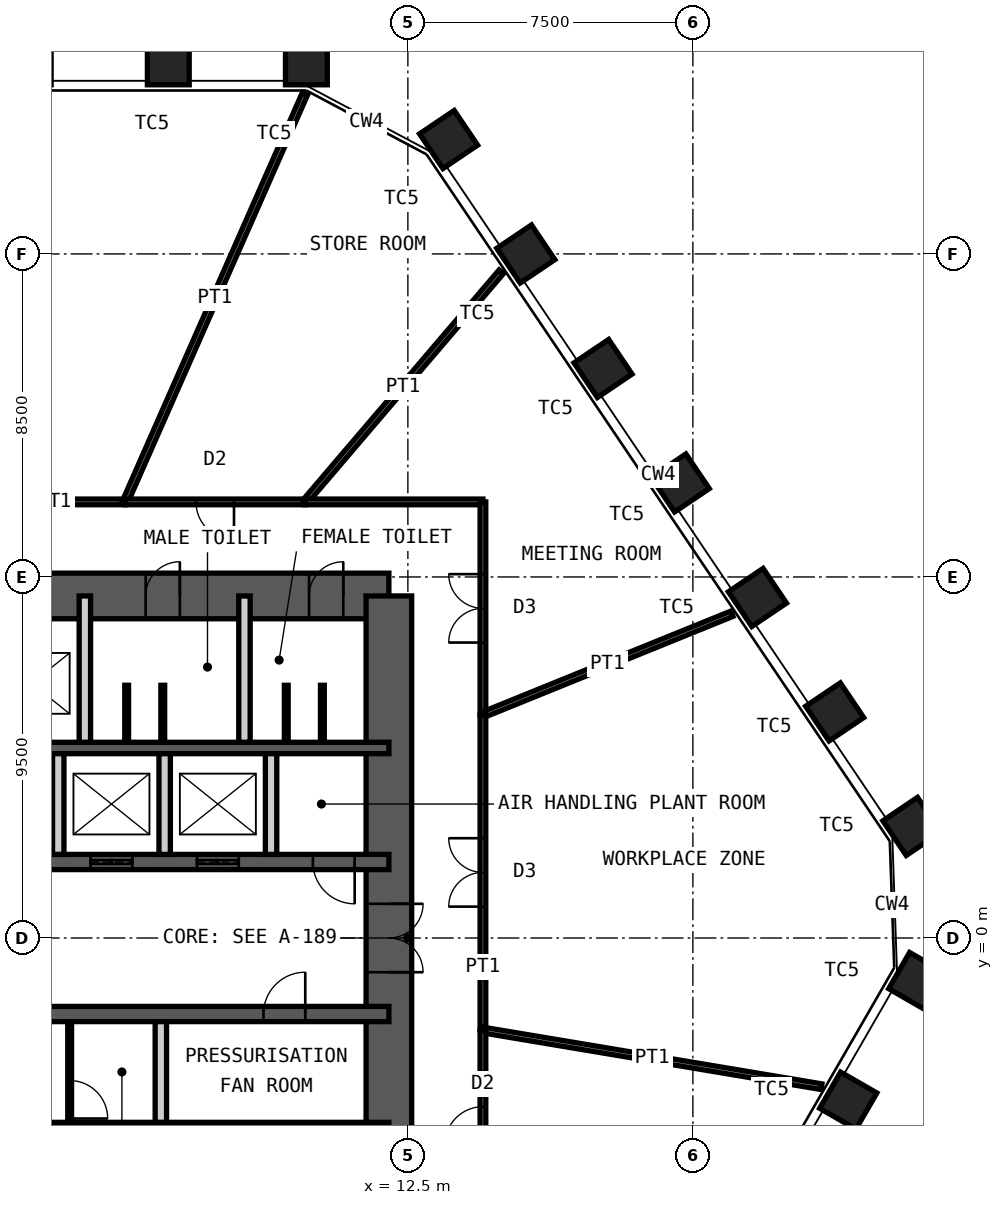
"""IFC4 building model, lengths in metres.
Left out: names, types, materials, properties, quantities, classifications, styles, units other than length and angle.
Written with IfcOpenShell. Run it as: python <this file> out.ifc"""

import sys

from ifc_helpers import new_model, si_unit, direction, frame, frame_2d, origin, origin_2d, place, context, subcontext, project, spatial, rectangle, hollow_rectangle, extrude, element, fill, save


model = new_model("IFC4")
c1 = context("Model", 3, precision=1e-05, world=origin(), true_north=direction((0.0, 1.0)))
c2 = subcontext(c1, "Body", "Model", "MODEL_VIEW")
j1 = project(units=[si_unit("LENGTHUNIT", "METRE"), si_unit("PLANEANGLEUNIT", "RADIAN")], contexts=[c1])
p1 = place(None, origin())
s1 = spatial("IfcSite", under=j1, at=p1, CompositionType="ELEMENT")
p2 = place(p1, origin())
s2 = spatial("IfcBuilding", under=s1, at=p2, CompositionType="ELEMENT")
p3 = place(p2, frame((0.0, 0.0, 188.8)))
s3 = spatial("IfcBuildingStorey", under=s2, at=p3, CompositionType="ELEMENT", Elevation=188.8)
for number, where, z_axis, x_axis in (
    (1, (6.196, 23.0, 0.0), (0.0, 0.0, 1.0), (-1.0, 0.0, 0.0)),
    (2, (9.829, 23.0, 0.0), (0.0, 0.0, 1.0), (-1.0, 0.0, 0.0)),
    (3, (13.571, 21.01, 0.0), (0.0, 0.0, 1.0), (-0.559, 0.829, 0.0)),
    (4, (15.603, 17.998, 0.0), (0.0, 0.0, 1.0), (-0.559, 0.829, 0.0)),
    (5, (17.635, 14.986, 0.0), (0.0, 0.0, 1.0), (-0.559, 0.829, 0.0)),
    (6, (19.667, 11.973, 0.0), (0.0, 0.0, 1.0), (-0.559, 0.829, 0.0)),
    (7, (21.699, 8.961, 0.0), (0.0, 0.0, 1.0), (-0.559, 0.829, 0.0)),
    (8, (23.731, 5.948, 0.0), (0.0, 0.0, 1.0), (-0.559, 0.829, 0.0)),
    (9, (25.762, 2.936, 0.0), (0.0, 0.0, 1.0), (-0.559, 0.829, 0.0)),
    (10, (25.905, -1.132, 0.0), (0.0, 0.0, 1.0), (0.5, 0.866, 0.0)),
    (11, (24.088, -4.279, 0.0), (0.0, 0.0, 1.0), (0.5, 0.866, 0.0)),
):
    element("IfcColumn", number, at=place(p3, frame(where, z_axis=z_axis, x_axis=x_axis)), inside=s3, PredefinedType="COLUMN", context=c2, shape_type="SweptSolid", body=[
        extrude(hollow_rectangle(XDim=1.1, YDim=1.1, WallThickness=0.07, at=origin_2d()), origin(), (0.0, 0.0, 1.0), 4.2),
    ])
p4 = place(p3, frame((-12.0, 9.0, 0.0), z_axis=(0.0, 0.0, 1.0), x_axis=(1.0, 0.0, 0.0)))
e12 = element("IfcWall", 12, at=p4, inside=s3, PredefinedType="SHEAR", context=c2, shape_type="SweptSolid", body=[
    extrude(rectangle(XDim=24.0, YDim=1.2, at=frame_2d((12.0, 0.0))), origin(), (0.0, 0.0, 1.0), 4.2),
])
p5 = place(p4, frame((10.4, 0.0, 0.0)))
e13 = element("IfcOpeningElement", 13, at=p5, cuts=e12, PredefinedType="OPENING", context=c2, shape_type="SweptSolid", body=[
    extrude(rectangle(XDim=1.0, YDim=2.1, at=frame_2d((0.5, 1.05))), frame((0.0, 0.61, 0.0), z_axis=(0.0, -1.0, 0.0), x_axis=(1.0, 0.0, 0.0)), (0.0, 0.0, 1.0), 1.22),
])
p6 = place(p4, frame((17.6, 0.0, 0.0)))
e14 = element("IfcOpeningElement", 14, at=p6, cuts=e12, PredefinedType="OPENING", context=c2, shape_type="SweptSolid", body=[
    extrude(rectangle(XDim=0.9, YDim=2.1, at=frame_2d((0.45, 1.05))), frame((0.0, 0.61, 0.0), z_axis=(0.0, -1.0, 0.0), x_axis=(1.0, 0.0, 0.0)), (0.0, 0.0, 1.0), 1.22),
])
p7 = place(p4, frame((21.9, 0.0, 0.0)))
e15 = element("IfcOpeningElement", 15, at=p7, cuts=e12, PredefinedType="OPENING", context=c2, shape_type="SweptSolid", body=[
    extrude(rectangle(XDim=0.9, YDim=2.1, at=frame_2d((0.45, 1.05))), frame((0.0, 0.61, 0.0), z_axis=(0.0, -1.0, 0.0), x_axis=(1.0, 0.0, 0.0)), (0.0, 0.0, 1.0), 1.22),
])
p8 = place(p3, frame((12.0, -9.0, 0.0), z_axis=(0.0, 0.0, 1.0), x_axis=(0.0, 1.0, 0.0)))
e16 = element("IfcWall", 16, at=p8, inside=s3, PredefinedType="SHEAR", context=c2, shape_type="SweptSolid", body=[
    extrude(rectangle(XDim=18.0, YDim=1.2, at=frame_2d((9.0, 0.0))), origin(), (0.0, 0.0, 1.0), 4.2),
])
p9 = place(p8, frame((8.1, 0.0, 0.0)))
e17 = element("IfcOpeningElement", 17, at=p9, cuts=e16, PredefinedType="OPENING", context=c2, shape_type="SweptSolid", body=[
    extrude(rectangle(XDim=1.8, YDim=2.1, at=frame_2d((0.9, 1.05))), frame((0.0, 0.61, 0.0), z_axis=(0.0, -1.0, 0.0), x_axis=(1.0, 0.0, 0.0)), (0.0, 0.0, 1.0), 1.22),
])
p10 = place(p3, frame((-12.0, 5.0, 0.0), z_axis=(0.0, 0.0, 1.0), x_axis=(1.0, 0.0, 0.0)))
e18 = element("IfcWall", 18, at=p10, inside=s3, PredefinedType="SHEAR", context=c2, shape_type="SweptSolid", body=[
    extrude(rectangle(XDim=24.0, YDim=0.3, at=frame_2d((12.0, 0.0))), origin(), (0.0, 0.0, 1.0), 4.2),
])
p11 = place(p3, frame((-12.0, 2.0, 0.0), z_axis=(0.0, 0.0, 1.0), x_axis=(1.0, 0.0, 0.0)))
e19 = element("IfcWall", 19, at=p11, inside=s3, PredefinedType="SHEAR", context=c2, shape_type="SweptSolid", body=[
    extrude(rectangle(XDim=24.0, YDim=0.4, at=frame_2d((12.0, 0.0))), origin(), (0.0, 0.0, 1.0), 4.2),
])
p12 = place(p11, frame((2.4, 0.0, 0.0)))
e20 = element("IfcOpeningElement", 20, at=p12, cuts=e19, PredefinedType="OPENING", context=c2, shape_type="SweptSolid", body=[
    extrude(rectangle(XDim=1.1, YDim=2.1, at=frame_2d((0.55, 1.05))), frame((0.0, 0.21, 0.0), z_axis=(0.0, -1.0, 0.0), x_axis=(1.0, 0.0, 0.0)), (0.0, 0.0, 1.0), 0.42),
])
p13 = place(p11, frame((22.0, 0.0, 0.0)))
e21 = element("IfcOpeningElement", 21, at=p13, cuts=e19, PredefinedType="OPENING", context=c2, shape_type="SweptSolid", body=[
    extrude(rectangle(XDim=1.1, YDim=2.1, at=frame_2d((0.55, 1.05))), frame((0.0, 0.21, 0.0), z_axis=(0.0, -1.0, 0.0), x_axis=(1.0, 0.0, 0.0)), (0.0, 0.0, 1.0), 0.42),
])
p14 = place(p11, frame((10.15, 0.0, 0.0)))
e22 = element("IfcOpeningElement", 22, at=p14, cuts=e19, PredefinedType="OPENING", context=c2, shape_type="SweptSolid", body=[
    extrude(rectangle(XDim=1.0, YDim=2.1, at=frame_2d((0.5, 1.05))), frame((0.0, 0.21, 0.0), z_axis=(0.0, -1.0, 0.0), x_axis=(1.0, 0.0, 0.0)), (0.0, 0.0, 1.0), 0.42),
])
p15 = place(p11, frame((6.9, 0.0, 0.0)))
e23 = element("IfcOpeningElement", 23, at=p15, cuts=e19, PredefinedType="OPENING", context=c2, shape_type="SweptSolid", body=[
    extrude(rectangle(XDim=1.0, YDim=2.1, at=frame_2d((0.5, 1.05))), frame((0.0, 0.21, 0.0), z_axis=(0.0, -1.0, 0.0), x_axis=(1.0, 0.0, 0.0)), (0.0, 0.0, 1.0), 0.42),
])
p16 = place(p11, frame((13.35, 0.0, 0.0)))
e24 = element("IfcOpeningElement", 24, at=p16, cuts=e19, PredefinedType="OPENING", context=c2, shape_type="SweptSolid", body=[
    extrude(rectangle(XDim=1.1, YDim=2.4, at=frame_2d((0.55, 1.2))), frame((0.0, 0.21, 0.0), z_axis=(0.0, -1.0, 0.0), x_axis=(1.0, 0.0, 0.0)), (0.0, 0.0, 1.0), 0.42),
])
p17 = place(p11, frame((16.15, 0.0, 0.0)))
e25 = element("IfcOpeningElement", 25, at=p17, cuts=e19, PredefinedType="OPENING", context=c2, shape_type="SweptSolid", body=[
    extrude(rectangle(XDim=1.1, YDim=2.4, at=frame_2d((0.55, 1.2))), frame((0.0, 0.21, 0.0), z_axis=(0.0, -1.0, 0.0), x_axis=(1.0, 0.0, 0.0)), (0.0, 0.0, 1.0), 0.42),
])
p18 = place(p11, frame((18.95, 0.0, 0.0)))
e26 = element("IfcOpeningElement", 26, at=p18, cuts=e19, PredefinedType="OPENING", context=c2, shape_type="SweptSolid", body=[
    extrude(rectangle(XDim=1.1, YDim=2.4, at=frame_2d((0.55, 1.2))), frame((0.0, 0.21, 0.0), z_axis=(0.0, -1.0, 0.0), x_axis=(1.0, 0.0, 0.0)), (0.0, 0.0, 1.0), 0.42),
])
p19 = place(p3, frame((-12.0, -2.0, 0.0), z_axis=(0.0, 0.0, 1.0), x_axis=(1.0, 0.0, 0.0)))
e27 = element("IfcWall", 27, at=p19, inside=s3, PredefinedType="SHEAR", context=c2, shape_type="SweptSolid", body=[
    extrude(rectangle(XDim=24.0, YDim=0.4, at=frame_2d((12.0, 0.0))), origin(), (0.0, 0.0, 1.0), 4.2),
])
p20 = place(p19, frame((1.1, 0.0, 0.0)))
e28 = element("IfcOpeningElement", 28, at=p20, cuts=e27, PredefinedType="OPENING", context=c2, shape_type="SweptSolid", body=[
    extrude(rectangle(XDim=1.1, YDim=2.1, at=frame_2d((0.55, 1.05))), frame((0.0, 0.21, 0.0), z_axis=(0.0, -1.0, 0.0), x_axis=(1.0, 0.0, 0.0)), (0.0, 0.0, 1.0), 0.42),
])
p21 = place(p19, frame((13.55, 0.0, 0.0)))
e29 = element("IfcOpeningElement", 29, at=p21, cuts=e27, PredefinedType="OPENING", context=c2, shape_type="SweptSolid", body=[
    extrude(rectangle(XDim=1.1, YDim=2.1, at=frame_2d((0.55, 1.05))), frame((0.0, 0.21, 0.0), z_axis=(0.0, -1.0, 0.0), x_axis=(1.0, 0.0, 0.0)), (0.0, 0.0, 1.0), 0.42),
])
p22 = place(p19, frame((20.7, 0.0, 0.0)))
e30 = element("IfcOpeningElement", 30, at=p22, cuts=e27, PredefinedType="OPENING", context=c2, shape_type="SweptSolid", body=[
    extrude(rectangle(XDim=1.1, YDim=2.1, at=frame_2d((0.55, 1.05))), frame((0.0, 0.21, 0.0), z_axis=(0.0, -1.0, 0.0), x_axis=(1.0, 0.0, 0.0)), (0.0, 0.0, 1.0), 0.42),
])
p23 = place(p19, frame((4.0, 0.0, 0.0)))
e31 = element("IfcOpeningElement", 31, at=p23, cuts=e27, PredefinedType="OPENING", context=c2, shape_type="SweptSolid", body=[
    extrude(rectangle(XDim=1.0, YDim=2.1, at=frame_2d((0.5, 1.05))), frame((0.0, 0.21, 0.0), z_axis=(0.0, -1.0, 0.0), x_axis=(1.0, 0.0, 0.0)), (0.0, 0.0, 1.0), 0.42),
])
p24 = place(p19, frame((6.8, 0.0, 0.0)))
e32 = element("IfcOpeningElement", 32, at=p24, cuts=e27, PredefinedType="OPENING", context=c2, shape_type="SweptSolid", body=[
    extrude(rectangle(XDim=1.0, YDim=2.1, at=frame_2d((0.5, 1.05))), frame((0.0, 0.21, 0.0), z_axis=(0.0, -1.0, 0.0), x_axis=(1.0, 0.0, 0.0)), (0.0, 0.0, 1.0), 0.42),
])
p25 = place(p3, frame((-12.0, -5.0, 0.0), z_axis=(0.0, 0.0, 1.0), x_axis=(1.0, 0.0, 0.0)))
e33 = element("IfcWall", 33, at=p25, inside=s3, PredefinedType="SHEAR", context=c2, shape_type="SweptSolid", body=[
    extrude(rectangle(XDim=24.0, YDim=0.3, at=frame_2d((12.0, 0.0))), origin(), (0.0, 0.0, 1.0), 4.2),
])
for number, where, z_axis, x_axis in (
    (34, (4.0, 5.15, 0.0), (0.0, 0.0, 1.0), (0.0, 1.0, 0.0)),
    (35, (8.2, 5.15, 0.0), (0.0, 0.0, 1.0), (0.0, 1.0, 0.0)),
):
    element("IfcWall", number, at=place(p3, frame(where, z_axis=z_axis, x_axis=x_axis)), inside=s3, PredefinedType="PARTITIONING", context=c2, shape_type="SweptSolid", body=[
        extrude(rectangle(XDim=3.85, YDim=0.3, at=frame_2d((1.925, 0.0))), origin(), (0.0, 0.0, 1.0), 3.98),
    ])
for number, where, z_axis, x_axis in (
    (36, (3.3, 2.2, 0.0), (0.0, 0.0, 1.0), (0.0, 1.0, 0.0)),
    (37, (6.1, 2.2, 0.0), (0.0, 0.0, 1.0), (0.0, 1.0, 0.0)),
    (38, (8.9, 2.2, 0.0), (0.0, 0.0, 1.0), (0.0, 1.0, 0.0)),
    (39, (6.0, -4.85, 0.0), (0.0, 0.0, 1.0), (0.0, 1.0, 0.0)),
):
    element("IfcWall", number, at=place(p3, frame(where, z_axis=z_axis, x_axis=x_axis)), inside=s3, PredefinedType="PARTITIONING", context=c2, shape_type="SweptSolid", body=[
        extrude(rectangle(XDim=2.65, YDim=0.3, at=frame_2d((1.325, 0.0))), origin(), (0.0, 0.0, 1.0), 3.98),
    ])
p26 = place(p3, frame((3.6, -4.85, 0.0), z_axis=(0.0, 0.0, 1.0), x_axis=(0.0, 1.0, 0.0)))
e40 = element("IfcWall", 40, at=p26, inside=s3, PredefinedType="PARTITIONING", context=c2, shape_type="SweptSolid", body=[
    extrude(rectangle(XDim=2.65, YDim=0.1, at=frame_2d((1.325, 0.0))), origin(), (0.0, 0.0, 1.0), 3.98),
])
p27 = place(p26, frame((0.1, 0.0, 0.0)))
e41 = element("IfcOpeningElement", 41, at=p27, cuts=e40, PredefinedType="OPENING", context=c2, shape_type="SweptSolid", body=[
    extrude(rectangle(XDim=1.0, YDim=2.4, at=frame_2d((0.5, 1.2))), frame((0.0, 0.06, 0.0), z_axis=(0.0, -1.0, 0.0), x_axis=(1.0, 0.0, 0.0)), (0.0, 0.0, 1.0), 0.12),
])
for number, where, z_axis, x_axis in (
    (42, (5.1, 5.15, 0.0), (0.0, 0.0, 1.0), (0.0, 1.0, 0.0)),
    (43, (6.05, 5.15, 0.0), (0.0, 0.0, 1.0), (0.0, 1.0, 0.0)),
    (44, (9.3, 5.15, 0.0), (0.0, 0.0, 1.0), (0.0, 1.0, 0.0)),
    (45, (10.25, 5.15, 0.0), (0.0, 0.0, 1.0), (0.0, 1.0, 0.0)),
):
    element("IfcWall", number, at=place(p3, frame(where, z_axis=z_axis, x_axis=x_axis)), inside=s3, PredefinedType="PARTITIONING", context=c2, shape_type="SweptSolid", body=[
        extrude(rectangle(XDim=1.5, YDim=0.1, at=frame_2d((0.75, 0.0))), origin(), (0.0, 0.0, 1.0), 2.1),
    ])
p28 = place(p3, frame((-4.291, 11.475, 0.0), z_axis=(0.0, 0.0, 1.0), x_axis=(1.0, 0.0, 0.0)))
e46 = element("IfcWall", 46, at=p28, inside=s3, PredefinedType="PARTITIONING", context=c2, shape_type="SweptSolid", body=[
    extrude(rectangle(XDim=9.349, YDim=0.15, at=frame_2d((4.674, 0.0))), origin(), (0.0, 0.0, 1.0), 4.03),
])
p29 = place(p28, frame((3.774, 0.0, 0.0)))
e47 = element("IfcOpeningElement", 47, at=p29, cuts=e46, PredefinedType="OPENING", context=c2, shape_type="SweptSolid", body=[
    extrude(rectangle(XDim=1.8, YDim=2.4, at=frame_2d((0.9, 1.2))), frame((0.0, 0.085, 0.0), z_axis=(0.0, -1.0, 0.0), x_axis=(1.0, 0.0, 0.0)), (0.0, 0.0, 1.0), 0.17),
])
p30 = place(p3, frame((9.789, 22.208, 0.0), z_axis=(0.0, 0.0, 1.0), x_axis=(-0.403346052835, -0.9150475188, 0.0)))
e48 = element("IfcWall", 48, at=p30, inside=s3, PredefinedType="PARTITIONING", context=c2, shape_type="SweptSolid", body=[
    extrude(rectangle(XDim=11.73, YDim=0.15, at=frame_2d((5.865, 0.0))), origin(), (0.0, 0.0, 1.0), 2.93),
])
p31 = place(p3, frame((5.058, 11.475, 0.0), z_axis=(0.0, 0.0, 1.0), x_axis=(1.0, 0.0, 0.0)))
e49 = element("IfcWall", 49, at=p31, inside=s3, PredefinedType="PARTITIONING", context=c2, shape_type="SweptSolid", body=[
    extrude(rectangle(XDim=4.733, YDim=0.15, at=frame_2d((2.367, 0.0))), origin(), (0.0, 0.0, 1.0), 4.03),
])
p32 = place(p31, frame((1.867, 0.0, 0.0)))
e50 = element("IfcOpeningElement", 50, at=p32, cuts=e49, PredefinedType="OPENING", context=c2, shape_type="SweptSolid", body=[
    extrude(rectangle(XDim=1.0, YDim=2.4, at=frame_2d((0.5, 1.2))), frame((0.0, 0.085, 0.0), z_axis=(0.0, -1.0, 0.0), x_axis=(1.0, 0.0, 0.0)), (0.0, 0.0, 1.0), 0.17),
])
p33 = place(p3, frame((14.958, 17.531, 0.0), z_axis=(0.0, 0.0, 1.0), x_axis=(-0.649097500837, -0.760705221756, 0.0)))
e51 = element("IfcWall", 51, at=p33, inside=s3, PredefinedType="PARTITIONING", context=c2, shape_type="SweptSolid", body=[
    extrude(rectangle(XDim=7.96, YDim=0.15, at=frame_2d((3.98, 0.0))), origin(), (0.0, 0.0, 1.0), 3.43),
])
p34 = place(p3, frame((9.791, 11.475, 0.0), z_axis=(0.0, 0.0, 1.0), x_axis=(1.0, 0.0, 0.0)))
e52 = element("IfcWall", 52, at=p34, inside=s3, PredefinedType="PARTITIONING", context=c2, shape_type="SweptSolid", body=[
    extrude(rectangle(XDim=4.684, YDim=0.15, at=frame_2d((2.342, 0.0))), origin(), (0.0, 0.0, 1.0), 4.03),
])
p35 = place(p3, frame((14.475, 11.475, 0.0), z_axis=(0.0, 0.0, 1.0), x_axis=(0.0, -1.0, 0.0)))
e53 = element("IfcWall", 53, at=p35, inside=s3, PredefinedType="PARTITIONING", context=c2, shape_type="SweptSolid", body=[
    extrude(rectangle(XDim=5.601, YDim=0.15, at=frame_2d((2.801, 0.0))), origin(), (0.0, 0.0, 1.0), 4.03),
])
p36 = place(p35, frame((1.901, 0.0, 0.0)))
e54 = element("IfcOpeningElement", 54, at=p36, cuts=e53, PredefinedType="OPENING", context=c2, shape_type="SweptSolid", body=[
    extrude(rectangle(XDim=1.8, YDim=2.4, at=frame_2d((0.9, 1.2))), frame((0.0, 0.085, 0.0), z_axis=(0.0, -1.0, 0.0), x_axis=(1.0, 0.0, 0.0)), (0.0, 0.0, 1.0), 0.17),
])
p37 = place(p3, frame((21.026, 8.532, 0.0), z_axis=(0.0, 0.0, 1.0), x_axis=(-0.926617028548, -0.376006492503, 0.0)))
e55 = element("IfcWall", 55, at=p37, inside=s3, PredefinedType="PARTITIONING", context=c2, shape_type="SweptSolid", body=[
    extrude(rectangle(XDim=7.07, YDim=0.15, at=frame_2d((3.535, 0.0))), origin(), (0.0, 0.0, 1.0), 3.43),
])
p38 = place(p3, frame((14.475, 5.874, 0.0), z_axis=(0.0, 0.0, 1.0), x_axis=(0.0, -1.0, 0.0)))
e56 = element("IfcWall", 56, at=p38, inside=s3, PredefinedType="PARTITIONING", context=c2, shape_type="SweptSolid", body=[
    extrude(rectangle(XDim=8.296, YDim=0.15, at=frame_2d((4.148, 0.0))), origin(), (0.0, 0.0, 1.0), 4.03),
])
p39 = place(p38, frame((3.248, 0.0, 0.0)))
e57 = element("IfcOpeningElement", 57, at=p39, cuts=e56, PredefinedType="OPENING", context=c2, shape_type="SweptSolid", body=[
    extrude(rectangle(XDim=1.8, YDim=2.4, at=frame_2d((0.9, 1.2))), frame((0.0, 0.085, 0.0), z_axis=(0.0, -1.0, 0.0), x_axis=(1.0, 0.0, 0.0)), (0.0, 0.0, 1.0), 0.17),
])
p40 = place(p3, frame((23.383, -3.912, 0.0), z_axis=(0.0, 0.0, 1.0), x_axis=(-0.986293651891, 0.164999491631, 0.0)))
e58 = element("IfcWall", 58, at=p40, inside=s3, PredefinedType="PARTITIONING", context=c2, shape_type="SweptSolid", body=[
    extrude(rectangle(XDim=9.032, YDim=0.15, at=frame_2d((4.516, 0.0))), origin(), (0.0, 0.0, 1.0), 3.43),
])
p41 = place(p3, frame((14.475, -2.422, 0.0), z_axis=(0.0, 0.0, 1.0), x_axis=(0.0, -1.0, 0.0)))
e59 = element("IfcWall", 59, at=p41, inside=s3, PredefinedType="PARTITIONING", context=c2, shape_type="SweptSolid", body=[
    extrude(rectangle(XDim=5.033, YDim=0.15, at=frame_2d((2.517, 0.0))), origin(), (0.0, 0.0, 1.0), 4.03),
])
p42 = place(p41, frame((2.017, 0.0, 0.0)))
e60 = element("IfcOpeningElement", 60, at=p42, cuts=e59, PredefinedType="OPENING", context=c2, shape_type="SweptSolid", body=[
    extrude(rectangle(XDim=1.0, YDim=2.4, at=frame_2d((0.5, 1.2))), frame((0.0, 0.085, 0.0), z_axis=(0.0, -1.0, 0.0), x_axis=(1.0, 0.0, 0.0)), (0.0, 0.0, 1.0), 0.17),
])
p43 = place(p6, origin())
e61 = element("IfcDoor", 61, at=p43, inside=s3, OperationType="SINGLE_SWING_LEFT", PredefinedType="DOOR", context=c2, shape_type="SweptSolid", body=[
    extrude(rectangle(XDim=0.9, YDim=2.1, at=frame_2d((0.45, 1.05))), frame((0.0, 0.025, 0.0), z_axis=(0.0, -1.0, 0.0), x_axis=(1.0, 0.0, 0.0)), (0.0, 0.0, 1.0), 0.05),
])
fill(e14, e61)
p44 = place(p7, origin())
e62 = element("IfcDoor", 62, at=p44, inside=s3, OperationType="SINGLE_SWING_LEFT", PredefinedType="DOOR", context=c2, shape_type="SweptSolid", body=[
    extrude(rectangle(XDim=0.9, YDim=2.1, at=frame_2d((0.45, 1.05))), frame((0.0, 0.025, 0.0), z_axis=(0.0, -1.0, 0.0), x_axis=(1.0, 0.0, 0.0)), (0.0, 0.0, 1.0), 0.05),
])
fill(e15, e62)
p45 = place(p13, origin())
e63 = element("IfcDoor", 63, at=p45, inside=s3, OperationType="SINGLE_SWING_RIGHT", PredefinedType="DOOR", context=c2, shape_type="SweptSolid", body=[
    extrude(rectangle(XDim=1.1, YDim=2.1, at=frame_2d((0.55, 1.05))), frame((0.0, 0.025, 0.0), z_axis=(0.0, -1.0, 0.0), x_axis=(1.0, 0.0, 0.0)), (0.0, 0.0, 1.0), 0.05),
])
fill(e21, e63)
p46 = place(p22, origin())
e64 = element("IfcDoor", 64, at=p46, inside=s3, OperationType="SINGLE_SWING_LEFT", PredefinedType="DOOR", context=c2, shape_type="SweptSolid", body=[
    extrude(rectangle(XDim=1.1, YDim=2.1, at=frame_2d((0.55, 1.05))), frame((0.0, 0.025, 0.0), z_axis=(0.0, -1.0, 0.0), x_axis=(1.0, 0.0, 0.0)), (0.0, 0.0, 1.0), 0.05),
])
fill(e30, e64)
p47 = place(p9, origin())
e65 = element("IfcDoor", 65, at=p47, inside=s3, OperationType="DOUBLE_DOOR_DOUBLE_SWING", PredefinedType="DOOR", context=c2, shape_type="SweptSolid", body=[
    extrude(rectangle(XDim=1.8, YDim=2.1, at=frame_2d((0.9, 1.05))), frame((0.0, 0.025, 0.0), z_axis=(0.0, -1.0, 0.0), x_axis=(1.0, 0.0, 0.0)), (0.0, 0.0, 1.0), 0.05),
])
fill(e17, e65)
p48 = place(p17, origin())
e66 = element("IfcDoor", 66, at=p48, inside=s3, OperationType="DOUBLE_DOOR_SLIDING", PredefinedType="DOOR", context=c2, shape_type="SweptSolid", body=[
    extrude(rectangle(XDim=1.1, YDim=2.4, at=frame_2d((0.55, 1.2))), frame((0.0, 0.025, 0.0), z_axis=(0.0, -1.0, 0.0), x_axis=(1.0, 0.0, 0.0)), (0.0, 0.0, 1.0), 0.05),
])
fill(e25, e66)
p49 = place(p18, origin())
e67 = element("IfcDoor", 67, at=p49, inside=s3, OperationType="DOUBLE_DOOR_SLIDING", PredefinedType="DOOR", context=c2, shape_type="SweptSolid", body=[
    extrude(rectangle(XDim=1.1, YDim=2.4, at=frame_2d((0.55, 1.2))), frame((0.0, 0.025, 0.0), z_axis=(0.0, -1.0, 0.0), x_axis=(1.0, 0.0, 0.0)), (0.0, 0.0, 1.0), 0.05),
])
fill(e26, e67)
p50 = place(p27, origin())
e68 = element("IfcDoor", 68, at=p50, inside=s3, OperationType="SINGLE_SWING_LEFT", PredefinedType="DOOR", context=c2, shape_type="SweptSolid", body=[
    extrude(rectangle(XDim=1.0, YDim=2.4, at=frame_2d((0.5, 1.2))), frame((0.0, 0.025, 0.0), z_axis=(0.0, -1.0, 0.0), x_axis=(1.0, 0.0, 0.0)), (0.0, 0.0, 1.0), 0.05),
])
fill(e41, e68)
p51 = place(p32, origin())
e69 = element("IfcDoor", 69, at=p51, inside=s3, OperationType="SINGLE_SWING_RIGHT", PredefinedType="DOOR", context=c2, shape_type="SweptSolid", body=[
    extrude(rectangle(XDim=1.0, YDim=2.4, at=frame_2d((0.5, 1.2))), frame((0.0, 0.025, 0.0), z_axis=(0.0, -1.0, 0.0), x_axis=(1.0, 0.0, 0.0)), (0.0, 0.0, 1.0), 0.05),
])
fill(e50, e69)
p52 = place(p36, origin())
e70 = element("IfcDoor", 70, at=p52, inside=s3, OperationType="DOUBLE_DOOR_DOUBLE_SWING", PredefinedType="DOOR", context=c2, shape_type="SweptSolid", body=[
    extrude(rectangle(XDim=1.8, YDim=2.4, at=frame_2d((0.9, 1.2))), frame((0.0, 0.025, 0.0), z_axis=(0.0, -1.0, 0.0), x_axis=(1.0, 0.0, 0.0)), (0.0, 0.0, 1.0), 0.05),
])
fill(e54, e70)
p53 = place(p39, origin())
e71 = element("IfcDoor", 71, at=p53, inside=s3, OperationType="DOUBLE_DOOR_DOUBLE_SWING", PredefinedType="DOOR", context=c2, shape_type="SweptSolid", body=[
    extrude(rectangle(XDim=1.8, YDim=2.4, at=frame_2d((0.9, 1.2))), frame((0.0, 0.025, 0.0), z_axis=(0.0, -1.0, 0.0), x_axis=(1.0, 0.0, 0.0)), (0.0, 0.0, 1.0), 0.05),
])
fill(e57, e71)
p54 = place(p42, origin())
e72 = element("IfcDoor", 72, at=p54, inside=s3, OperationType="SINGLE_SWING_RIGHT", PredefinedType="DOOR", context=c2, shape_type="SweptSolid", body=[
    extrude(rectangle(XDim=1.0, YDim=2.4, at=frame_2d((0.5, 1.2))), frame((0.0, 0.025, 0.0), z_axis=(0.0, -1.0, 0.0), x_axis=(1.0, 0.0, 0.0)), (0.0, 0.0, 1.0), 0.05),
])
fill(e60, e72)
save(model, sys.argv[1])
